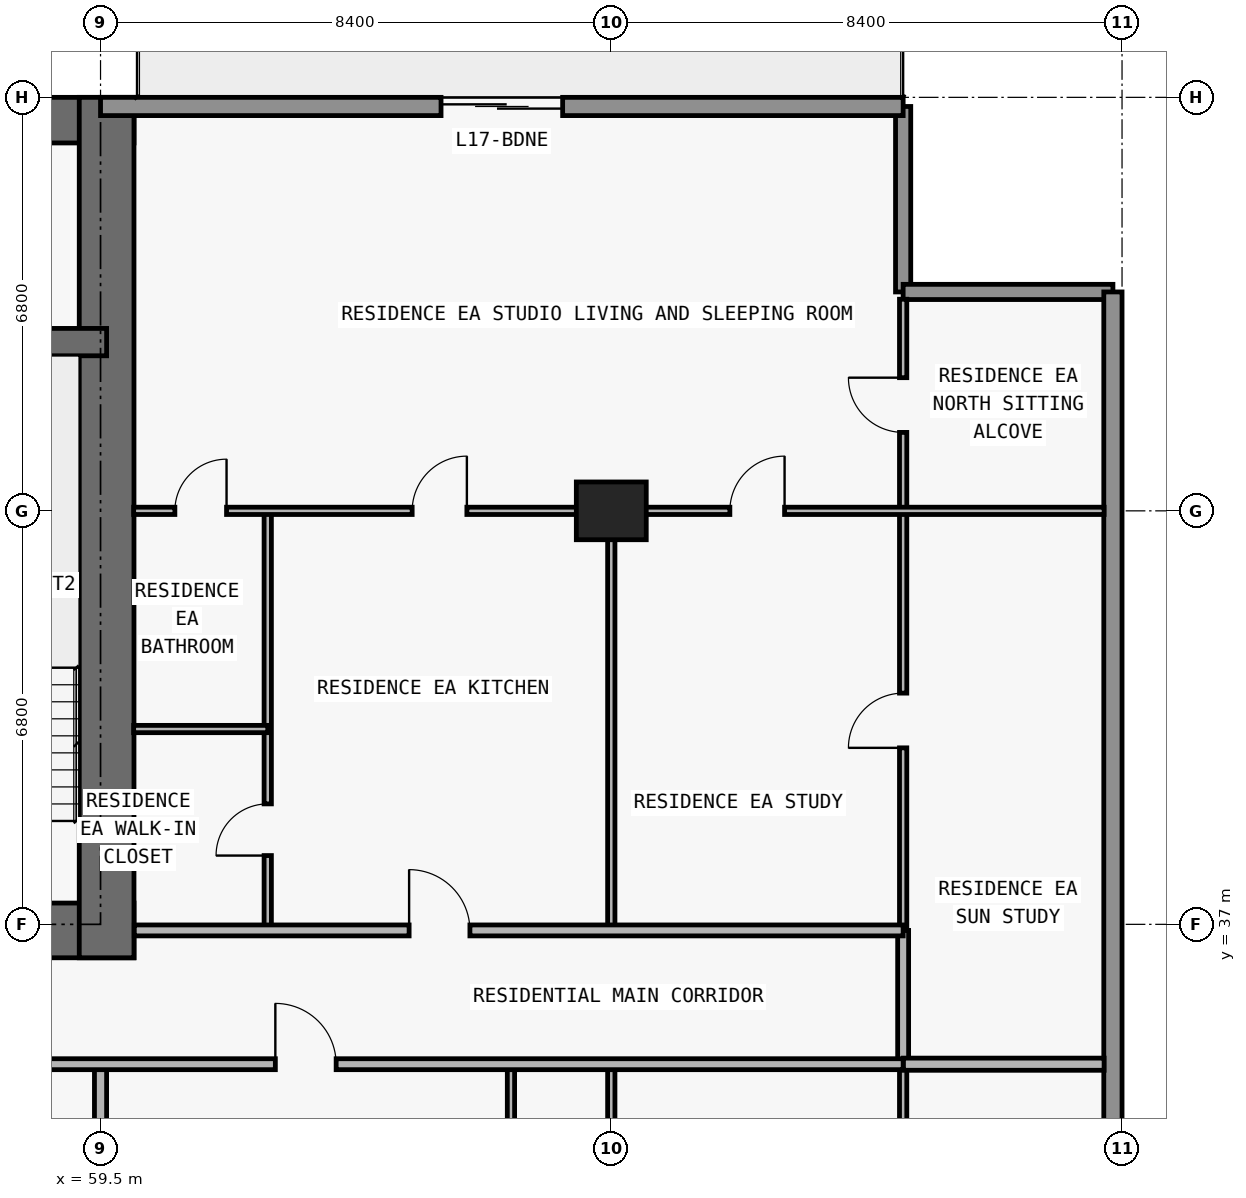
"""IFC4 building model, lengths in metres.
Left out: names, types, materials, properties, quantities, classifications, styles, units other than length and angle.
Written with IfcOpenShell. Run it as: python <this file> out.ifc"""

import sys

from ifc_helpers import new_model, si_unit, direction, frame, frame_2d, origin, origin_2d, place, context, subcontext, project, spatial, rectangle, extrude, element, fill, save


model = new_model("IFC4")
c1 = context("Model", 3, precision=1e-05, world=origin(), true_north=direction((0.0, 1.0)))
c2 = subcontext(c1, "Body", "Model", "MODEL_VIEW")
j1 = project(units=[si_unit("LENGTHUNIT", "METRE"), si_unit("PLANEANGLEUNIT", "RADIAN")], contexts=[c1])
p1 = place(None, origin())
s1 = spatial("IfcSite", under=j1, at=p1, CompositionType="ELEMENT")
p2 = place(p1, origin())
s2 = spatial("IfcBuilding", under=s1, at=p2, CompositionType="ELEMENT")
p3 = place(p2, frame((0.0, 0.0, 66.3)))
s3 = spatial("IfcBuildingStorey", under=s2, at=p3, CompositionType="ELEMENT", Elevation=66.3)
p4 = place(p3, frame((67.9, 43.8, 0.0), z_axis=(0.0, 0.0, 1.0), x_axis=(1.0, 0.0, 0.0)))
e1 = element("IfcColumn", 1, at=p4, inside=s3, PredefinedType="COLUMN", context=c2, shape_type="SweptSolid", body=[
    extrude(rectangle(XDim=1.15, YDim=0.95, at=origin_2d()), origin(), (0.0, 0.0, 1.0), 3.05),
])
p5 = place(p3, frame((17.75, 36.9, 0.0), z_axis=(0.0, 0.0, 1.0), x_axis=(1.0, 0.0, 0.0)))
e2 = element("IfcWall", 2, at=p5, inside=s3, PredefinedType="SHEAR", context=c2, shape_type="SweptSolid", body=[
    extrude(rectangle(XDim=42.3, YDim=0.9, at=frame_2d((21.15, 0.0))), origin(), (0.0, 0.0, 1.0), 3.05),
])
p6 = place(p5, frame((14.55, 0.0, 0.0)))
e3 = element("IfcOpeningElement", 3, at=p6, cuts=e2, PredefinedType="OPENING", context=c2, shape_type="SweptSolid", body=[
    extrude(rectangle(XDim=1.1, YDim=2.15, at=frame_2d((0.55, 1.075))), frame((0.0, 0.46, 0.0), z_axis=(0.0, -1.0, 0.0), x_axis=(1.0, 0.0, 0.0)), (0.0, 0.0, 1.0), 0.92),
])
p7 = place(p5, frame((6.4, 0.0, 0.0)))
e4 = element("IfcOpeningElement", 4, at=p7, cuts=e2, PredefinedType="OPENING", context=c2, shape_type="SweptSolid", body=[
    extrude(rectangle(XDim=1.05, YDim=2.15, at=frame_2d((0.525, 1.075))), frame((0.0, 0.46, 0.0), z_axis=(0.0, -1.0, 0.0), x_axis=(1.0, 0.0, 0.0)), (0.0, 0.0, 1.0), 0.92),
])
p8 = place(p5, frame((34.9, 0.0, 0.0)))
e5 = element("IfcOpeningElement", 5, at=p8, cuts=e2, PredefinedType="OPENING", context=c2, shape_type="SweptSolid", body=[
    extrude(rectangle(XDim=1.05, YDim=2.15, at=frame_2d((0.525, 1.075))), frame((0.0, 0.46, 0.0), z_axis=(0.0, -1.0, 0.0), x_axis=(1.0, 0.0, 0.0)), (0.0, 0.0, 1.0), 0.92),
])
p9 = place(p5, frame((11.012, 0.0, 0.0)))
e6 = element("IfcOpeningElement", 6, at=p9, cuts=e2, PredefinedType="OPENING", context=c2, shape_type="SweptSolid", body=[
    extrude(rectangle(XDim=1.05, YDim=2.15, at=frame_2d((0.525, 1.075))), frame((0.0, 0.46, 0.0), z_axis=(0.0, -1.0, 0.0), x_axis=(1.0, 0.0, 0.0)), (0.0, 0.0, 1.0), 0.92),
])
p10 = place(p5, frame((24.25, 0.0, 0.0)))
e7 = element("IfcOpeningElement", 7, at=p10, cuts=e2, PredefinedType="OPENING", context=c2, shape_type="SweptSolid", body=[
    extrude(rectangle(XDim=1.05, YDim=2.15, at=frame_2d((0.525, 1.075))), frame((0.0, 0.46, 0.0), z_axis=(0.0, -1.0, 0.0), x_axis=(1.0, 0.0, 0.0)), (0.0, 0.0, 1.0), 0.92),
])
p11 = place(p3, frame((17.75, 50.225, 0.0), z_axis=(0.0, 0.0, 1.0), x_axis=(1.0, 0.0, 0.0)))
e8 = element("IfcWall", 8, at=p11, inside=s3, PredefinedType="SHEAR", context=c2, shape_type="SweptSolid", body=[
    extrude(rectangle(XDim=42.3, YDim=0.75, at=frame_2d((21.15, 0.0))), origin(), (0.0, 0.0, 1.0), 3.05),
])
p12 = place(p3, frame((59.6, 36.45, 0.0), z_axis=(0.0, 0.0, 1.0), x_axis=(0.0, 1.0, 0.0)))
e9 = element("IfcWall", 9, at=p12, inside=s3, PredefinedType="SHEAR", context=c2, shape_type="SweptSolid", body=[
    extrude(rectangle(XDim=14.15, YDim=0.9, at=frame_2d((7.075, 0.0))), origin(), (0.0, 0.0, 1.0), 3.05),
])
p13 = place(p3, frame((18.2, 46.575, 0.0), z_axis=(0.0, 0.0, 1.0), x_axis=(1.0, 0.0, 0.0)))
e10 = element("IfcWall", 10, at=p13, inside=s3, PredefinedType="SHEAR", context=c2, shape_type="SweptSolid", body=[
    extrude(rectangle(XDim=41.4, YDim=0.45, at=frame_2d((20.7, 0.0))), origin(), (0.0, 0.0, 1.0), 3.05),
])
p14 = place(p13, frame((7.675, 0.0, 0.0)))
e11 = element("IfcOpeningElement", 11, at=p14, cuts=e10, PredefinedType="OPENING", context=c2, shape_type="SweptSolid", body=[
    extrude(rectangle(XDim=1.05, YDim=2.15, at=frame_2d((0.525, 1.075))), frame((0.0, 0.235, 0.0), z_axis=(0.0, -1.0, 0.0), x_axis=(1.0, 0.0, 0.0)), (0.0, 0.0, 1.0), 0.47),
])
p15 = place(p13, frame((32.725, 0.0, 0.0)))
e12 = element("IfcOpeningElement", 12, at=p15, cuts=e10, PredefinedType="OPENING", context=c2, shape_type="SweptSolid", body=[
    extrude(rectangle(XDim=1.05, YDim=2.15, at=frame_2d((0.525, 1.075))), frame((0.0, 0.235, 0.0), z_axis=(0.0, -1.0, 0.0), x_axis=(1.0, 0.0, 0.0)), (0.0, 0.0, 1.0), 0.47),
])
p16 = place(p3, frame((72.7, 50.45, 0.0), z_axis=(0.0, 0.0, 1.0), x_axis=(0.0, -1.0, 0.0)))
e13 = element("IfcWall", 13, at=p16, inside=s3, PredefinedType="ELEMENTEDWALL", context=c2, shape_type="SweptSolid", body=[
    extrude(rectangle(XDim=3.05, YDim=0.25, at=frame_2d((1.525, 0.0))), origin(), (0.0, 0.0, 1.0), 3.05),
])
p17 = place(p3, frame((72.7, 47.4, 0.0), z_axis=(0.0, 0.0, 1.0), x_axis=(1.0, 0.0, 0.0)))
e14 = element("IfcWall", 14, at=p17, inside=s3, PredefinedType="ELEMENTEDWALL", context=c2, shape_type="SweptSolid", body=[
    extrude(rectangle(XDim=3.45, YDim=0.25, at=frame_2d((1.725, 0.0))), origin(), (0.0, 0.0, 1.0), 3.05),
])
p18 = place(p3, frame((76.15, 47.4, 0.0), z_axis=(0.0, 0.0, 1.0), x_axis=(0.0, -1.0, 0.0)))
e15 = element("IfcWall", 15, at=p18, inside=s3, PredefinedType="STANDARD", context=c2, shape_type="SweptSolid", body=[
    extrude(rectangle(XDim=20.6, YDim=0.3, at=frame_2d((10.3, 0.0))), origin(), (0.0, 0.0, 1.0), 3.05),
])
p19 = place(p3, frame((59.5, 50.45, 0.0), z_axis=(0.0, 0.0, 1.0), x_axis=(1.0, 0.0, 0.0)))
e16 = element("IfcWall", 16, at=p19, inside=s3, PredefinedType="STANDARD", context=c2, shape_type="SweptSolid", body=[
    extrude(rectangle(XDim=13.2, YDim=0.3, at=frame_2d((6.6, 0.0))), origin(), (0.0, 0.0, 1.0), 3.05),
])
p20 = place(p19, frame((5.6, 0.0, 0.0)))
e17 = element("IfcOpeningElement", 17, at=p20, cuts=e16, PredefinedType="OPENING", context=c2, shape_type="SweptSolid", body=[
    extrude(rectangle(XDim=2.0, YDim=2.3, at=frame_2d((1.0, 1.15))), frame((0.0, 0.16, 0.0), z_axis=(0.0, -1.0, 0.0), x_axis=(1.0, 0.0, 0.0)), (0.0, 0.0, 1.0), 0.32),
])
p21 = place(p3, frame((59.5, 26.44, 0.0), z_axis=(0.0, 0.0, 1.0), x_axis=(0.0, 1.0, 0.0)))
e18 = element("IfcWall", 18, at=p21, inside=s3, PredefinedType="PARTITIONING", context=c2, shape_type="SweptSolid", body=[
    extrude(rectangle(XDim=8.26, YDim=0.2, at=frame_2d((4.13, 0.0))), origin(), (0.0, 0.0, 1.0), 2.11),
])
p22 = place(p3, frame((62.25, 36.9, 0.0), z_axis=(0.0, 0.0, 1.0), x_axis=(0.0, 1.0, 0.0)))
e19 = element("IfcWall", 19, at=p22, inside=s3, PredefinedType="PARTITIONING", context=c2, shape_type="SweptSolid", body=[
    extrude(rectangle(XDim=6.9, YDim=0.12, at=frame_2d((3.45, 0.0))), origin(), (0.0, 0.0, 1.0), 3.05),
])
p23 = place(p22, frame((1.231, 0.0, 0.0)))
e20 = element("IfcOpeningElement", 20, at=p23, cuts=e19, PredefinedType="OPENING", context=c2, shape_type="SweptSolid", body=[
    extrude(rectangle(XDim=0.85, YDim=2.1, at=frame_2d((0.425, 1.05))), frame((0.0, 0.07, 0.0), z_axis=(0.0, -1.0, 0.0), x_axis=(1.0, 0.0, 0.0)), (0.0, 0.0, 1.0), 0.14),
])
p24 = place(p3, frame((66.25, 26.44, 0.0), z_axis=(0.0, 0.0, 1.0), x_axis=(0.0, 1.0, 0.0)))
e21 = element("IfcWall", 21, at=p24, inside=s3, PredefinedType="PARTITIONING", context=c2, shape_type="SweptSolid", body=[
    extrude(rectangle(XDim=8.26, YDim=0.12, at=frame_2d((4.13, 0.0))), origin(), (0.0, 0.0, 1.0), 3.05),
])
p25 = place(p24, frame((4.005, 0.0, 0.0)))
e22 = element("IfcOpeningElement", 22, at=p25, cuts=e21, PredefinedType="OPENING", context=c2, shape_type="SweptSolid", body=[
    extrude(rectangle(XDim=0.85, YDim=2.1, at=frame_2d((0.425, 1.05))), frame((0.0, 0.07, 0.0), z_axis=(0.0, -1.0, 0.0), x_axis=(1.0, 0.0, 0.0)), (0.0, 0.0, 1.0), 0.14),
])
p26 = place(p3, frame((67.9, 26.44, 0.0), z_axis=(0.0, 0.0, 1.0), x_axis=(0.0, 1.0, 0.0)))
e23 = element("IfcWall", 23, at=p26, inside=s3, PredefinedType="PARTITIONING", context=c2, shape_type="SweptSolid", body=[
    extrude(rectangle(XDim=8.26, YDim=0.12, at=frame_2d((4.13, 0.0))), origin(), (0.0, 0.0, 1.0), 2.11),
])
p27 = place(p3, frame((67.9, 36.9, 0.0), z_axis=(0.0, 0.0, 1.0), x_axis=(0.0, 1.0, 0.0)))
e24 = element("IfcWall", 24, at=p27, inside=s3, PredefinedType="PARTITIONING", context=c2, shape_type="SweptSolid", body=[
    extrude(rectangle(XDim=6.9, YDim=0.12, at=frame_2d((3.45, 0.0))), origin(), (0.0, 0.0, 1.0), 2.11),
])
p28 = place(p3, frame((72.7, 26.44, 0.0), z_axis=(0.0, 0.0, 1.0), x_axis=(0.0, 1.0, 0.0)))
e25 = element("IfcWall", 25, at=p28, inside=s3, PredefinedType="PARTITIONING", context=c2, shape_type="SweptSolid", body=[
    extrude(rectangle(XDim=8.26, YDim=0.12, at=frame_2d((4.13, 0.0))), origin(), (0.0, 0.0, 1.0), 3.05),
])
p29 = place(p3, frame((72.7, 34.705, 0.0), z_axis=(0.0, 0.0, 1.0), x_axis=(0.0, 1.0, 0.0)))
e26 = element("IfcWall", 26, at=p29, inside=s3, PredefinedType="PARTITIONING", context=c2, shape_type="SweptSolid", body=[
    extrude(rectangle(XDim=2.195, YDim=0.18, at=frame_2d((1.097, 0.0))), origin(), (0.0, 0.0, 1.0), 3.05),
])
p30 = place(p3, frame((72.7, 36.905, 0.0), z_axis=(0.0, 0.0, 1.0), x_axis=(0.0, 1.0, 0.0)))
e27 = element("IfcWall", 27, at=p30, inside=s3, PredefinedType="PARTITIONING", context=c2, shape_type="SweptSolid", body=[
    extrude(rectangle(XDim=10.375, YDim=0.12, at=frame_2d((5.188, 0.0))), origin(), (0.0, 0.0, 1.0), 3.05),
])
p31 = place(p30, frame((2.998, 0.0, 0.0)))
e28 = element("IfcOpeningElement", 28, at=p31, cuts=e27, PredefinedType="OPENING", context=c2, shape_type="SweptSolid", body=[
    extrude(rectangle(XDim=0.9, YDim=2.15, at=frame_2d((0.45, 1.075))), frame((0.0, 0.07, 0.0), z_axis=(0.0, -1.0, 0.0), x_axis=(1.0, 0.0, 0.0)), (0.0, 0.0, 1.0), 0.14),
])
p32 = place(p30, frame((8.185, 0.0, 0.0)))
e29 = element("IfcOpeningElement", 29, at=p32, cuts=e27, PredefinedType="OPENING", context=c2, shape_type="SweptSolid", body=[
    extrude(rectangle(XDim=0.9, YDim=2.15, at=frame_2d((0.45, 1.075))), frame((0.0, 0.07, 0.0), z_axis=(0.0, -1.0, 0.0), x_axis=(1.0, 0.0, 0.0)), (0.0, 0.0, 1.0), 0.14),
])
p33 = place(p3, frame((26.7, 34.7, 0.0), z_axis=(0.0, 0.0, 1.0), x_axis=(1.0, 0.0, 0.0)))
e30 = element("IfcWall", 30, at=p33, inside=s3, PredefinedType="PARTITIONING", context=c2, shape_type="SweptSolid", body=[
    extrude(rectangle(XDim=46.0, YDim=0.18, at=frame_2d((23.0, 0.0))), origin(), (0.0, 0.0, 1.0), 3.05),
])
p34 = place(p33, frame((2.875, 0.0, 0.0)))
e31 = element("IfcOpeningElement", 31, at=p34, cuts=e30, PredefinedType="OPENING", context=c2, shape_type="SweptSolid", body=[
    extrude(rectangle(XDim=1.0, YDim=2.2, at=frame_2d((0.5, 1.1))), frame((0.0, 0.1, 0.0), z_axis=(0.0, -1.0, 0.0), x_axis=(1.0, 0.0, 0.0)), (0.0, 0.0, 1.0), 0.2),
])
p35 = place(p33, frame((10.875, 0.0, 0.0)))
e32 = element("IfcOpeningElement", 32, at=p35, cuts=e30, PredefinedType="OPENING", context=c2, shape_type="SweptSolid", body=[
    extrude(rectangle(XDim=1.0, YDim=2.2, at=frame_2d((0.5, 1.1))), frame((0.0, 0.1, 0.0), z_axis=(0.0, -1.0, 0.0), x_axis=(1.0, 0.0, 0.0)), (0.0, 0.0, 1.0), 0.2),
])
p36 = place(p33, frame((18.875, 0.0, 0.0)))
e33 = element("IfcOpeningElement", 33, at=p36, cuts=e30, PredefinedType="OPENING", context=c2, shape_type="SweptSolid", body=[
    extrude(rectangle(XDim=1.0, YDim=2.2, at=frame_2d((0.5, 1.1))), frame((0.0, 0.1, 0.0), z_axis=(0.0, -1.0, 0.0), x_axis=(1.0, 0.0, 0.0)), (0.0, 0.0, 1.0), 0.2),
])
p37 = place(p33, frame((27.275, 0.0, 0.0)))
e34 = element("IfcOpeningElement", 34, at=p37, cuts=e30, PredefinedType="OPENING", context=c2, shape_type="SweptSolid", body=[
    extrude(rectangle(XDim=1.0, YDim=2.2, at=frame_2d((0.5, 1.1))), frame((0.0, 0.1, 0.0), z_axis=(0.0, -1.0, 0.0), x_axis=(1.0, 0.0, 0.0)), (0.0, 0.0, 1.0), 0.2),
])
p38 = place(p33, frame((35.675, 0.0, 0.0)))
e35 = element("IfcOpeningElement", 35, at=p38, cuts=e30, PredefinedType="OPENING", context=c2, shape_type="SweptSolid", body=[
    extrude(rectangle(XDim=1.0, YDim=2.2, at=frame_2d((0.5, 1.1))), frame((0.0, 0.1, 0.0), z_axis=(0.0, -1.0, 0.0), x_axis=(1.0, 0.0, 0.0)), (0.0, 0.0, 1.0), 0.2),
])
p39 = place(p3, frame((72.705, 34.7, 0.0), z_axis=(0.0, 0.0, 1.0), x_axis=(1.0, 0.0, 0.0)))
e36 = element("IfcWall", 36, at=p39, inside=s3, PredefinedType="PARTITIONING", context=c2, shape_type="SweptSolid", body=[
    extrude(rectangle(XDim=3.3, YDim=0.2, at=frame_2d((1.65, 0.0))), origin(), (0.0, 0.0, 1.0), 3.05),
])
p40 = place(p3, frame((60.055, 36.9, 0.0), z_axis=(0.0, 0.0, 1.0), x_axis=(1.0, 0.0, 0.0)))
e37 = element("IfcWall", 37, at=p40, inside=s3, PredefinedType="PARTITIONING", context=c2, shape_type="SweptSolid", body=[
    extrude(rectangle(XDim=12.645, YDim=0.18, at=frame_2d((6.323, 0.0))), origin(), (0.0, 0.0, 1.0), 3.05),
])
p41 = place(p40, frame((4.52, 0.0, 0.0)))
e38 = element("IfcOpeningElement", 38, at=p41, cuts=e37, PredefinedType="OPENING", context=c2, shape_type="SweptSolid", body=[
    extrude(rectangle(XDim=1.0, YDim=2.2, at=frame_2d((0.5, 1.1))), frame((0.0, 0.1, 0.0), z_axis=(0.0, -1.0, 0.0), x_axis=(1.0, 0.0, 0.0)), (0.0, 0.0, 1.0), 0.2),
])
p42 = place(p3, frame((60.045, 40.212, 0.0), z_axis=(0.0, 0.0, 1.0), x_axis=(1.0, 0.0, 0.0)))
e39 = element("IfcWall", 39, at=p42, inside=s3, PredefinedType="PARTITIONING", context=c2, shape_type="SweptSolid", body=[
    extrude(rectangle(XDim=2.205, YDim=0.12, at=frame_2d((1.103, 0.0))), origin(), (0.0, 0.0, 1.0), 3.05),
])
p43 = place(p3, frame((60.045, 43.8, 0.0), z_axis=(0.0, 0.0, 1.0), x_axis=(1.0, 0.0, 0.0)))
e40 = element("IfcWall", 40, at=p43, inside=s3, PredefinedType="PARTITIONING", context=c2, shape_type="SweptSolid", body=[
    extrude(rectangle(XDim=15.96, YDim=0.12, at=frame_2d((7.98, 0.0))), origin(), (0.0, 0.0, 1.0), 2.339),
])
p44 = place(p43, frame((9.805, 0.0, 0.0)))
e41 = element("IfcOpeningElement", 41, at=p44, cuts=e40, PredefinedType="OPENING", context=c2, shape_type="SweptSolid", body=[
    extrude(rectangle(XDim=0.9, YDim=2.15, at=frame_2d((0.45, 1.075))), frame((0.0, 0.07, 0.0), z_axis=(0.0, -1.0, 0.0), x_axis=(1.0, 0.0, 0.0)), (0.0, 0.0, 1.0), 0.14),
])
p45 = place(p43, frame((4.58, 0.0, 0.0)))
e42 = element("IfcOpeningElement", 42, at=p45, cuts=e40, PredefinedType="OPENING", context=c2, shape_type="SweptSolid", body=[
    extrude(rectangle(XDim=0.9, YDim=2.15, at=frame_2d((0.45, 1.075))), frame((0.0, 0.07, 0.0), z_axis=(0.0, -1.0, 0.0), x_axis=(1.0, 0.0, 0.0)), (0.0, 0.0, 1.0), 0.14),
])
p46 = place(p43, frame((0.677, 0.0, 0.0)))
e43 = element("IfcOpeningElement", 43, at=p46, cuts=e40, PredefinedType="OPENING", context=c2, shape_type="SweptSolid", body=[
    extrude(rectangle(XDim=0.85, YDim=2.1, at=frame_2d((0.425, 1.05))), frame((0.0, 0.07, 0.0), z_axis=(0.0, -1.0, 0.0), x_axis=(1.0, 0.0, 0.0)), (0.0, 0.0, 1.0), 0.14),
])
p47 = place(p20, origin())
e44 = element("IfcDoor", 44, at=p47, inside=s3, OperationType="DOUBLE_DOOR_SLIDING", PredefinedType="DOOR", context=c2, shape_type="SweptSolid", body=[
    extrude(rectangle(XDim=2.0, YDim=2.3, at=frame_2d((1.0, 1.15))), frame((0.0, 0.025, 0.0), z_axis=(0.0, -1.0, 0.0), x_axis=(1.0, 0.0, 0.0)), (0.0, 0.0, 1.0), 0.05),
])
fill(e17, e44)
p48 = place(p38, origin())
e45 = element("IfcDoor", 45, at=p48, inside=s3, OperationType="SINGLE_SWING_LEFT", PredefinedType="DOOR", context=c2, shape_type="SweptSolid", body=[
    extrude(rectangle(XDim=1.0, YDim=2.2, at=frame_2d((0.5, 1.1))), frame((0.0, 0.025, 0.0), z_axis=(0.0, -1.0, 0.0), x_axis=(1.0, 0.0, 0.0)), (0.0, 0.0, 1.0), 0.05),
])
fill(e35, e45)
p49 = place(p44, origin())
e46 = element("IfcDoor", 46, at=p49, inside=s3, OperationType="SINGLE_SWING_RIGHT", PredefinedType="DOOR", context=c2, shape_type="SweptSolid", body=[
    extrude(rectangle(XDim=0.9, YDim=2.15, at=frame_2d((0.45, 1.075))), frame((0.0, 0.025, 0.0), z_axis=(0.0, -1.0, 0.0), x_axis=(1.0, 0.0, 0.0)), (0.0, 0.0, 1.0), 0.05),
])
fill(e41, e46)
p50 = place(p41, origin())
e47 = element("IfcDoor", 47, at=p50, inside=s3, OperationType="SINGLE_SWING_LEFT", PredefinedType="DOOR", context=c2, shape_type="SweptSolid", body=[
    extrude(rectangle(XDim=1.0, YDim=2.2, at=frame_2d((0.5, 1.1))), frame((0.0, 0.025, 0.0), z_axis=(0.0, -1.0, 0.0), x_axis=(1.0, 0.0, 0.0)), (0.0, 0.0, 1.0), 0.05),
])
fill(e38, e47)
p51 = place(p45, origin())
e48 = element("IfcDoor", 48, at=p51, inside=s3, OperationType="SINGLE_SWING_RIGHT", PredefinedType="DOOR", context=c2, shape_type="SweptSolid", body=[
    extrude(rectangle(XDim=0.9, YDim=2.15, at=frame_2d((0.45, 1.075))), frame((0.0, 0.025, 0.0), z_axis=(0.0, -1.0, 0.0), x_axis=(1.0, 0.0, 0.0)), (0.0, 0.0, 1.0), 0.05),
])
fill(e42, e48)
p52 = place(p23, origin())
e49 = element("IfcDoor", 49, at=p52, inside=s3, OperationType="SINGLE_SWING_LEFT", PredefinedType="DOOR", context=c2, shape_type="SweptSolid", body=[
    extrude(rectangle(XDim=0.85, YDim=2.1, at=frame_2d((0.425, 1.05))), frame((0.0, 0.025, 0.0), z_axis=(0.0, -1.0, 0.0), x_axis=(1.0, 0.0, 0.0)), (0.0, 0.0, 1.0), 0.05),
])
fill(e20, e49)
p53 = place(p46, origin())
e50 = element("IfcDoor", 50, at=p53, inside=s3, OperationType="SINGLE_SWING_RIGHT", PredefinedType="DOOR", context=c2, shape_type="SweptSolid", body=[
    extrude(rectangle(XDim=0.85, YDim=2.1, at=frame_2d((0.425, 1.05))), frame((0.0, 0.025, 0.0), z_axis=(0.0, -1.0, 0.0), x_axis=(1.0, 0.0, 0.0)), (0.0, 0.0, 1.0), 0.05),
])
fill(e43, e50)
p54 = place(p31, origin())
e51 = element("IfcDoor", 51, at=p54, inside=s3, OperationType="SINGLE_SWING_LEFT", PredefinedType="DOOR", context=c2, shape_type="SweptSolid", body=[
    extrude(rectangle(XDim=0.9, YDim=2.15, at=frame_2d((0.45, 1.075))), frame((0.0, 0.025, 0.0), z_axis=(0.0, -1.0, 0.0), x_axis=(1.0, 0.0, 0.0)), (0.0, 0.0, 1.0), 0.05),
])
fill(e28, e51)
p55 = place(p32, origin())
e52 = element("IfcDoor", 52, at=p55, inside=s3, OperationType="SINGLE_SWING_RIGHT", PredefinedType="DOOR", context=c2, shape_type="SweptSolid", body=[
    extrude(rectangle(XDim=0.9, YDim=2.15, at=frame_2d((0.45, 1.075))), frame((0.0, 0.025, 0.0), z_axis=(0.0, -1.0, 0.0), x_axis=(1.0, 0.0, 0.0)), (0.0, 0.0, 1.0), 0.05),
])
fill(e29, e52)
save(model, sys.argv[1])
